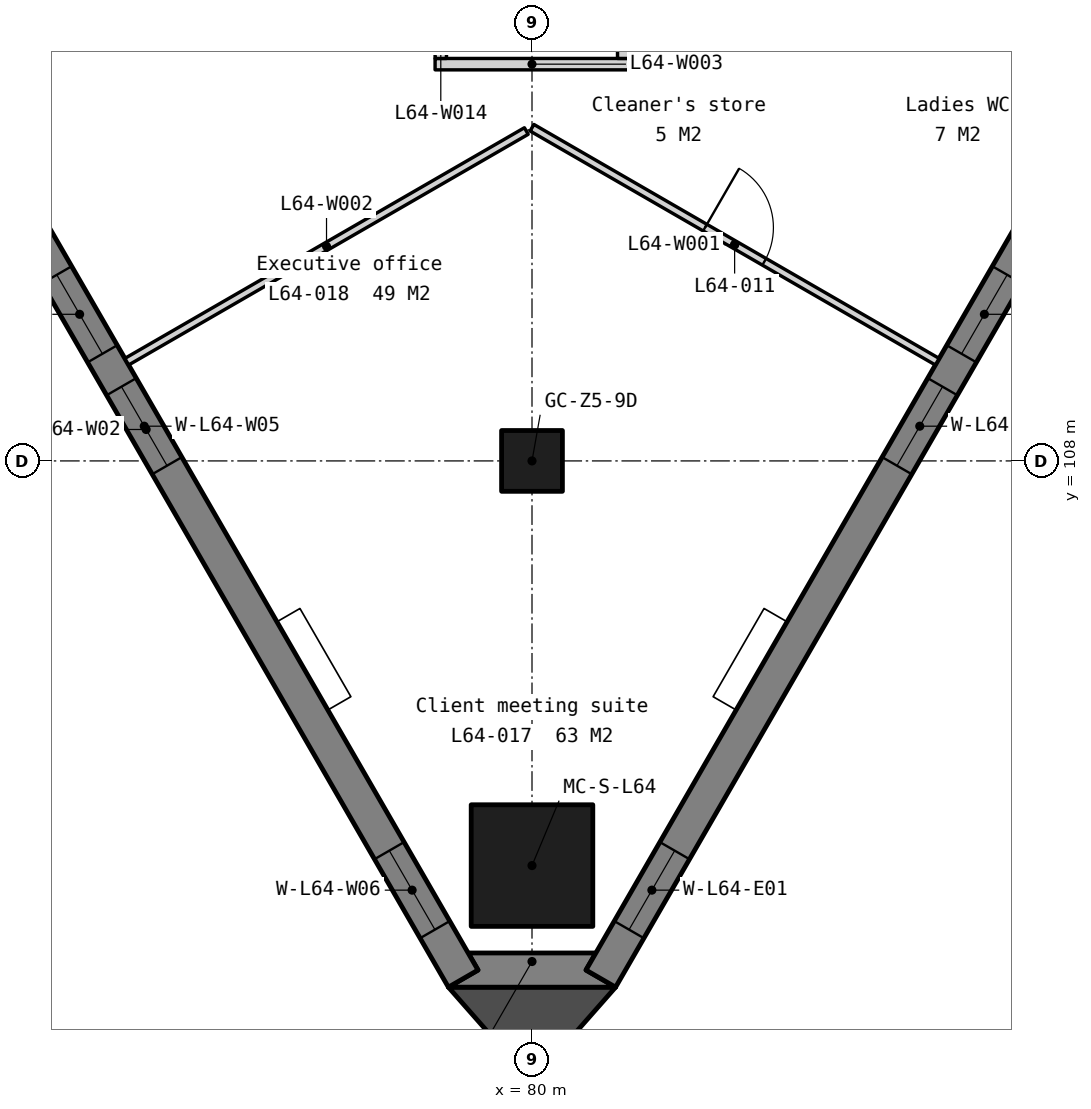
"""IFC4 building model, lengths in metres.
Left out: names, types, materials, properties, quantities, classifications, styles, units other than length and angle.
Written with IfcOpenShell. Run it as: python <this file> out.ifc"""

import sys

from ifc_helpers import new_model, si_unit, direction, frame, frame_2d, origin, origin_2d, place, context, subcontext, project, spatial, polyline, rectangle, outline, extrude, element, fill, save


model = new_model("IFC4")
c1 = context("Model", 3, precision=1e-05, world=origin(), true_north=direction((0.0, 1.0)))
c2 = subcontext(c1, "Body", "Model", "MODEL_VIEW")
j1 = project(units=[si_unit("LENGTHUNIT", "METRE"), si_unit("PLANEANGLEUNIT", "RADIAN")], contexts=[c1])
p1 = place(None, origin())
s1 = spatial("IfcSite", under=j1, at=p1, CompositionType="ELEMENT")
p2 = place(p1, origin())
s2 = spatial("IfcBuilding", under=s1, at=p2, CompositionType="ELEMENT")
p3 = place(p2, frame((0.0, 0.0, 262.1)))
s3 = spatial("IfcBuildingStorey", under=s2, at=p3, CompositionType="ELEMENT", Elevation=262.1)
p4 = place(p3, frame((80.0, 108.0, 0.0), z_axis=(0.0, 0.0, 1.0), x_axis=(1.0, 0.0, 0.0)))
e1 = element("IfcColumn", 1, at=p4, inside=s3, PredefinedType="COLUMN", context=c2, shape_type="SweptSolid", body=[
    extrude(rectangle(XDim=0.8, YDim=0.8, at=origin_2d()), origin(), (0.0, 0.0, 1.0), 3.9),
])
p5 = place(p3, frame((80.0, 102.676, 0.0), z_axis=(0.0, 0.0, 1.0), x_axis=(1.0, 0.0, 0.0)))
e2 = element("IfcColumn", 2, at=p5, inside=s3, PredefinedType="COLUMN", context=c2, shape_type="SweptSolid", body=[
    extrude(rectangle(XDim=1.6, YDim=1.6, at=origin_2d()), origin(), (0.0, 0.0, 1.0), 3.9),
])
p6 = place(p3, frame((0.0, 0.0, -0.15)))
e3 = element("IfcWall", 3, at=p6, inside=s3, PredefinedType="SOLIDWALL", context=c2, shape_type="SweptSolid", body=[
    extrude(outline(polyline([(78.9, 101.076), (79.29, 101.301), (79.16, 101.526), (80.84, 101.526), (80.71, 101.301), (81.1, 101.076), (78.9, 101.076)])), origin(), (0.0, 0.0, 1.0), 3.9),
])
p7 = place(p3, frame((70.752, 115.639, -0.15), z_axis=(0.0, 0.0, 1.0), x_axis=(0.500006996263, -0.866021364453, 0.0)))
e4 = element("IfcWall", 4, at=p7, inside=s3, PredefinedType="SOLIDWALL", context=c2, shape_type="SweptSolid", body=[
    extrude(outline(polyline([(16.686, 3.9), (16.686, 0.0), (0.0, 0.0), (0.0, 3.9), (16.686, 3.9)])), frame((0.0, 0.225, 0.0), z_axis=(0.0, -1.0, 0.0), x_axis=(1.0, 0.0, 0.0)), (0.0, 0.0, 1.0), 0.45),
])
p8 = place(p7, frame((5.993, 0.0, 0.95)))
e5 = element("IfcOpeningElement", 5, at=p8, cuts=e4, PredefinedType="OPENING", context=c2, shape_type="SweptSolid", body=[
    extrude(rectangle(XDim=1.2, YDim=2.2, at=frame_2d((0.6, 1.1))), frame((0.0, 0.235, 0.0), z_axis=(0.0, -1.0, 0.0), x_axis=(1.0, 0.0, 0.0)), (0.0, 0.0, 1.0), 0.47),
])
p9 = place(p7, frame((7.693, 0.0, 0.95)))
e6 = element("IfcOpeningElement", 6, at=p9, cuts=e4, PredefinedType="OPENING", context=c2, shape_type="SweptSolid", body=[
    extrude(rectangle(XDim=1.2, YDim=2.2, at=frame_2d((0.6, 1.1))), frame((0.0, 0.235, 0.0), z_axis=(0.0, -1.0, 0.0), x_axis=(1.0, 0.0, 0.0)), (0.0, 0.0, 1.0), 0.47),
])
p10 = place(p7, frame((14.742, 0.0, 0.95)))
e7 = element("IfcOpeningElement", 7, at=p10, cuts=e4, PredefinedType="OPENING", context=c2, shape_type="SweptSolid", body=[
    extrude(rectangle(XDim=1.2, YDim=2.2, at=frame_2d((0.6, 1.1))), frame((0.0, 0.235, 0.0), z_axis=(0.0, -1.0, 0.0), x_axis=(1.0, 0.0, 0.0)), (0.0, 0.0, 1.0), 0.47),
])
p11 = place(p3, frame((80.905, 101.188, -0.15), z_axis=(0.0, 0.0, 1.0), x_axis=(0.500002536638, 0.866023939251, 0.0)))
e8 = element("IfcWall", 8, at=p11, inside=s3, PredefinedType="SOLIDWALL", context=c2, shape_type="SweptSolid", body=[
    extrude(outline(polyline([(36.972, 0.0), (36.972, 3.9), (0.0, 3.9), (0.0, 0.0), (36.972, 0.0)])), frame((0.0, 0.225, 0.0), z_axis=(0.0, -1.0, 0.0), x_axis=(1.0, 0.0, 0.0)), (0.0, 0.0, 1.0), 0.45),
])
p12 = place(p11, frame((0.744, 0.0, 0.95)))
e9 = element("IfcOpeningElement", 9, at=p12, cuts=e8, PredefinedType="OPENING", context=c2, shape_type="SweptSolid", body=[
    extrude(rectangle(XDim=1.2, YDim=2.2, at=frame_2d((0.6, 1.1))), frame((0.0, 0.235, 0.0), z_axis=(0.0, -1.0, 0.0), x_axis=(1.0, 0.0, 0.0)), (0.0, 0.0, 1.0), 0.47),
])
p13 = place(p11, frame((7.793, 0.0, 0.95)))
e10 = element("IfcOpeningElement", 10, at=p13, cuts=e8, PredefinedType="OPENING", context=c2, shape_type="SweptSolid", body=[
    extrude(rectangle(XDim=1.2, YDim=2.2, at=frame_2d((0.6, 1.1))), frame((0.0, 0.235, 0.0), z_axis=(0.0, -1.0, 0.0), x_axis=(1.0, 0.0, 0.0)), (0.0, 0.0, 1.0), 0.47),
])
p14 = place(p11, frame((9.493, 0.0, 0.95)))
e11 = element("IfcOpeningElement", 11, at=p14, cuts=e8, PredefinedType="OPENING", context=c2, shape_type="SweptSolid", body=[
    extrude(rectangle(XDim=1.2, YDim=2.2, at=frame_2d((0.6, 1.1))), frame((0.0, 0.235, 0.0), z_axis=(0.0, -1.0, 0.0), x_axis=(1.0, 0.0, 0.0)), (0.0, 0.0, 1.0), 0.47),
])
p15 = place(p11, frame((17.036, 0.0, 0.95)))
e12 = element("IfcOpeningElement", 12, at=p15, cuts=e8, PredefinedType="OPENING", context=c2, shape_type="SweptSolid", body=[
    extrude(rectangle(XDim=1.2, YDim=2.2, at=frame_2d((0.6, 1.1))), frame((0.0, 0.235, 0.0), z_axis=(0.0, -1.0, 0.0), x_axis=(1.0, 0.0, 0.0)), (0.0, 0.0, 1.0), 0.47),
])
p16 = place(p11, frame((18.736, 0.0, 0.95)))
e13 = element("IfcOpeningElement", 13, at=p16, cuts=e8, PredefinedType="OPENING", context=c2, shape_type="SweptSolid", body=[
    extrude(rectangle(XDim=1.2, YDim=2.2, at=frame_2d((0.6, 1.1))), frame((0.0, 0.235, 0.0), z_axis=(0.0, -1.0, 0.0), x_axis=(1.0, 0.0, 0.0)), (0.0, 0.0, 1.0), 0.47),
])
p17 = place(p11, frame((26.279, 0.0, 0.95)))
e14 = element("IfcOpeningElement", 14, at=p17, cuts=e8, PredefinedType="OPENING", context=c2, shape_type="SweptSolid", body=[
    extrude(rectangle(XDim=1.2, YDim=2.2, at=frame_2d((0.6, 1.1))), frame((0.0, 0.235, 0.0), z_axis=(0.0, -1.0, 0.0), x_axis=(1.0, 0.0, 0.0)), (0.0, 0.0, 1.0), 0.47),
])
p18 = place(p11, frame((27.979, 0.0, 0.95)))
e15 = element("IfcOpeningElement", 15, at=p18, cuts=e8, PredefinedType="OPENING", context=c2, shape_type="SweptSolid", body=[
    extrude(rectangle(XDim=1.2, YDim=2.2, at=frame_2d((0.6, 1.1))), frame((0.0, 0.235, 0.0), z_axis=(0.0, -1.0, 0.0), x_axis=(1.0, 0.0, 0.0)), (0.0, 0.0, 1.0), 0.47),
])
p19 = place(p11, frame((35.028, 0.0, 0.95)))
e16 = element("IfcOpeningElement", 16, at=p19, cuts=e8, PredefinedType="OPENING", context=c2, shape_type="SweptSolid", body=[
    extrude(rectangle(XDim=1.2, YDim=2.2, at=frame_2d((0.6, 1.1))), frame((0.0, 0.235, 0.0), z_axis=(0.0, -1.0, 0.0), x_axis=(1.0, 0.0, 0.0)), (0.0, 0.0, 1.0), 0.47),
])
p20 = place(p3, frame((0.0, 0.0, -0.15)))
e17 = element("IfcWall", 17, at=p20, inside=s3, PredefinedType="SOLIDWALL", context=c2, shape_type="SweptSolid", body=[
    extrude(outline(polyline([(78.9, 101.076), (80.0, 99.826), (81.1, 101.076), (78.9, 101.076)])), origin(), (0.0, 0.0, 1.0), 3.9),
])
p21 = place(p3, frame((80.0, 112.384, 0.0), z_axis=(0.0, 0.0, 1.0), x_axis=(0.866021154418, -0.500007360046, 0.0)))
e18 = element("IfcWall", 18, at=p21, inside=s3, PredefinedType="PARTITIONING", context=c2, shape_type="SweptSolid", body=[
    extrude(rectangle(XDim=6.157, YDim=0.1, at=frame_2d((3.078, 0.0))), origin(), (0.0, 0.0, 1.0), 3.75),
])
p22 = place(p21, frame((2.628, 0.0, 0.0)))
e19 = element("IfcOpeningElement", 19, at=p22, cuts=e18, PredefinedType="OPENING", context=c2, shape_type="SweptSolid", body=[
    extrude(rectangle(XDim=0.9, YDim=2.1, at=frame_2d((0.45, 1.05))), frame((0.0, 0.06, 0.0), z_axis=(0.0, -1.0, 0.0), x_axis=(1.0, 0.0, 0.0)), (0.0, 0.0, 1.0), 0.12),
])
p23 = place(p3, frame((74.668, 109.305, 0.0), z_axis=(0.0, 0.0, 1.0), x_axis=(0.866016800201, 0.500014901547, 0.0)))
e20 = element("IfcWall", 20, at=p23, inside=s3, PredefinedType="PARTITIONING", context=c2, shape_type="SweptSolid", body=[
    extrude(rectangle(XDim=6.07, YDim=0.1, at=frame_2d((3.035, 0.0))), origin(), (0.0, 0.0, 1.0), 3.75),
])
p24 = place(p3, frame((78.725, 113.22, 0.0), z_axis=(0.0, 0.0, 1.0), x_axis=(1.0, 0.0, 0.0)))
e21 = element("IfcWall", 21, at=p24, inside=s3, PredefinedType="PARTITIONING", context=c2, shape_type="SweptSolid", body=[
    extrude(rectangle(XDim=2.55, YDim=0.15, at=frame_2d((1.275, 0.0))), origin(), (0.0, 0.0, 1.0), 3.28),
])
p25 = place(p3, frame((81.2, 113.295, 0.0), z_axis=(0.0, 0.0, 1.0), x_axis=(0.0, 1.0, 0.0)))
e22 = element("IfcWall", 22, at=p25, inside=s3, PredefinedType="PARTITIONING", context=c2, shape_type="SweptSolid", body=[
    extrude(rectangle(XDim=0.655, YDim=0.15, at=frame_2d((0.327, 0.0))), origin(), (0.0, 0.0, 1.0), 3.75),
])
p26 = place(p3, frame((72.357, 113.308, 0.0), z_axis=(0.0, 0.0, 1.0), x_axis=(0.866016048378, 0.500016203689, 0.0)))
e23 = element("IfcWall", 23, at=p26, inside=s3, PredefinedType="PARTITIONING", context=c2, shape_type="SweptSolid", body=[
    extrude(rectangle(XDim=7.314, YDim=0.2, at=frame_2d((3.657, 0.0))), origin(), (0.0, 0.0, 1.0), 3.75),
])
p27 = place(p3, frame((78.8, 113.295, 0.0), z_axis=(0.0, 0.0, 1.0), x_axis=(0.0, 1.0, 0.0)))
e24 = element("IfcWall", 24, at=p27, inside=s3, PredefinedType="PARTITIONING", context=c2, shape_type="SweptSolid", body=[
    extrude(rectangle(XDim=3.732, YDim=0.15, at=frame_2d((1.866, 0.0))), origin(), (0.0, 0.0, 1.0), 3.75),
])
p28 = place(p27, frame((0.966, 0.0, 0.0)))
e25 = element("IfcOpeningElement", 25, at=p28, cuts=e24, PredefinedType="OPENING", context=c2, shape_type="SweptSolid", body=[
    extrude(rectangle(XDim=1.8, YDim=2.1, at=frame_2d((0.9, 1.05))), frame((0.0, 0.085, 0.0), z_axis=(0.0, -1.0, 0.0), x_axis=(1.0, 0.0, 0.0)), (0.0, 0.0, 1.0), 0.17),
])
p29 = place(p8, origin())
e26 = element("IfcWindow", 26, at=p29, inside=s3, PartitioningType="SINGLE_PANEL", PredefinedType="WINDOW", context=c2, shape_type="SweptSolid", body=[
    extrude(rectangle(XDim=1.2, YDim=2.2, at=frame_2d((0.6, 1.1))), frame((0.0, 0.03, 0.0), z_axis=(0.0, -1.0, 0.0), x_axis=(1.0, 0.0, 0.0)), (0.0, 0.0, 1.0), 0.06),
])
fill(e5, e26)
p30 = place(p9, origin())
e27 = element("IfcWindow", 27, at=p30, inside=s3, PartitioningType="SINGLE_PANEL", PredefinedType="WINDOW", context=c2, shape_type="SweptSolid", body=[
    extrude(rectangle(XDim=1.2, YDim=2.2, at=frame_2d((0.6, 1.1))), frame((0.0, 0.03, 0.0), z_axis=(0.0, -1.0, 0.0), x_axis=(1.0, 0.0, 0.0)), (0.0, 0.0, 1.0), 0.06),
])
fill(e6, e27)
p31 = place(p10, origin())
e28 = element("IfcWindow", 28, at=p31, inside=s3, PartitioningType="SINGLE_PANEL", PredefinedType="WINDOW", context=c2, shape_type="SweptSolid", body=[
    extrude(rectangle(XDim=1.2, YDim=2.2, at=frame_2d((0.6, 1.1))), frame((0.0, 0.03, 0.0), z_axis=(0.0, -1.0, 0.0), x_axis=(1.0, 0.0, 0.0)), (0.0, 0.0, 1.0), 0.06),
])
fill(e7, e28)
p32 = place(p12, origin())
e29 = element("IfcWindow", 29, at=p32, inside=s3, PartitioningType="SINGLE_PANEL", PredefinedType="WINDOW", context=c2, shape_type="SweptSolid", body=[
    extrude(rectangle(XDim=1.2, YDim=2.2, at=frame_2d((0.6, 1.1))), frame((0.0, 0.03, 0.0), z_axis=(0.0, -1.0, 0.0), x_axis=(1.0, 0.0, 0.0)), (0.0, 0.0, 1.0), 0.06),
])
fill(e9, e29)
p33 = place(p13, origin())
e30 = element("IfcWindow", 30, at=p33, inside=s3, PartitioningType="SINGLE_PANEL", PredefinedType="WINDOW", context=c2, shape_type="SweptSolid", body=[
    extrude(rectangle(XDim=1.2, YDim=2.2, at=frame_2d((0.6, 1.1))), frame((0.0, 0.03, 0.0), z_axis=(0.0, -1.0, 0.0), x_axis=(1.0, 0.0, 0.0)), (0.0, 0.0, 1.0), 0.06),
])
fill(e10, e30)
p34 = place(p14, origin())
e31 = element("IfcWindow", 31, at=p34, inside=s3, PartitioningType="SINGLE_PANEL", PredefinedType="WINDOW", context=c2, shape_type="SweptSolid", body=[
    extrude(rectangle(XDim=1.2, YDim=2.2, at=frame_2d((0.6, 1.1))), frame((0.0, 0.03, 0.0), z_axis=(0.0, -1.0, 0.0), x_axis=(1.0, 0.0, 0.0)), (0.0, 0.0, 1.0), 0.06),
])
fill(e11, e31)
p35 = place(p22, origin())
e32 = element("IfcDoor", 32, at=p35, inside=s3, OperationType="SINGLE_SWING_LEFT", PredefinedType="DOOR", context=c2, shape_type="SweptSolid", body=[
    extrude(rectangle(XDim=0.9, YDim=2.1, at=frame_2d((0.45, 1.05))), frame((0.0, 0.025, 0.0), z_axis=(0.0, -1.0, 0.0), x_axis=(1.0, 0.0, 0.0)), (0.0, 0.0, 1.0), 0.05),
])
fill(e19, e32)
save(model, sys.argv[1])
